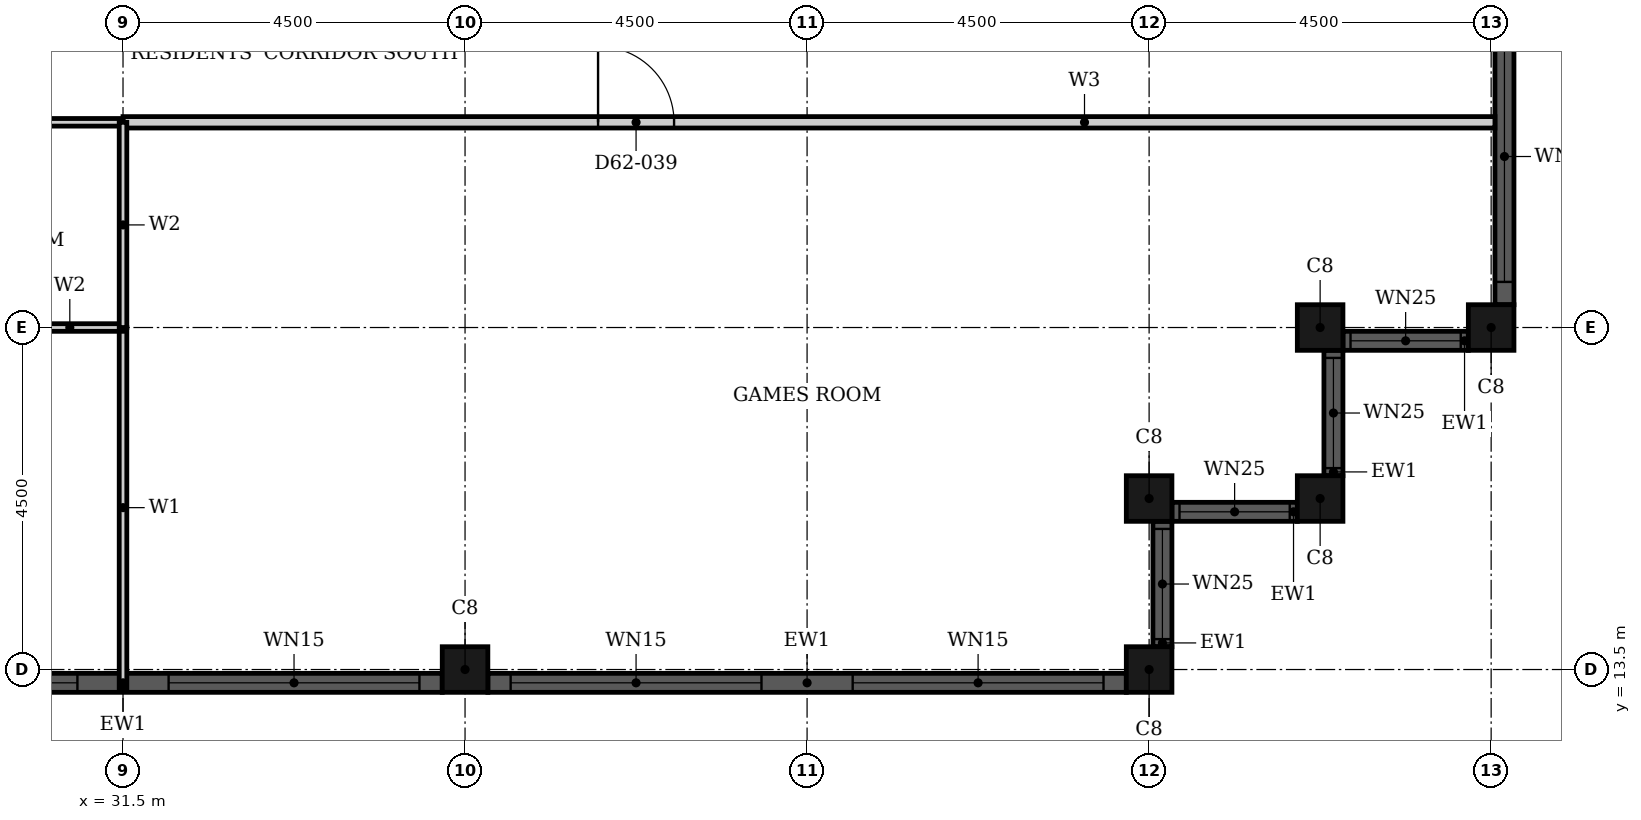
"""IFC4 building model, lengths in metres.
Left out: names, types, materials, properties, quantities, classifications, styles, units other than length and angle.
Written with IfcOpenShell. Run it as: python <this file> out.ifc"""

import sys

from ifc_helpers import new_model, si_unit, direction, frame, frame_2d, origin, origin_2d, place, context, subcontext, project, spatial, rectangle, hollow_rectangle, extrude, element, fill, save


model = new_model("IFC4")
c1 = context("Model", 3, precision=1e-05, world=origin(), true_north=direction((0.0, 1.0)))
c2 = subcontext(c1, "Body", "Model", "MODEL_VIEW")
j1 = project(units=[si_unit("LENGTHUNIT", "METRE"), si_unit("PLANEANGLEUNIT", "RADIAN")], contexts=[c1])
p1 = place(None, origin())
s1 = spatial("IfcSite", under=j1, at=p1, CompositionType="ELEMENT")
p2 = place(p1, origin())
s2 = spatial("IfcBuilding", under=s1, at=p2, CompositionType="ELEMENT")
p3 = place(p2, frame((0.0, 0.0, 245.3)))
s3 = spatial("IfcBuildingStorey", under=s2, at=p3, CompositionType="ELEMENT", Elevation=245.3)
for number, where, z_axis, x_axis in (
    (1, (36.0, 13.5, 0.0), (0.0, 0.0, 1.0), (1.0, 0.0, 0.0)),
    (2, (45.0, 13.5, 0.0), (0.0, 0.0, 1.0), (1.0, 0.0, 0.0)),
    (3, (45.0, 15.75, 0.0), (0.0, 0.0, 1.0), (1.0, 0.0, 0.0)),
    (4, (47.25, 15.75, 0.0), (0.0, 0.0, 1.0), (1.0, 0.0, 0.0)),
    (5, (47.25, 18.0, 0.0), (0.0, 0.0, 1.0), (1.0, 0.0, 0.0)),
    (6, (49.5, 18.0, 0.0), (0.0, 0.0, 1.0), (1.0, 0.0, 0.0)),
):
    element("IfcColumn", number, at=place(p3, frame(where, z_axis=z_axis, x_axis=x_axis)), inside=s3, PredefinedType="COLUMN", context=c2, shape_type="SweptSolid", body=[
        extrude(hollow_rectangle(XDim=0.6, YDim=0.6, WallThickness=0.02, at=origin_2d()), origin(), (0.0, 0.0, 1.0), 3.7),
    ])
p4 = place(p3, frame((27.3, 13.325, 0.0), z_axis=(0.0, 0.0, 1.0), x_axis=(1.0, 0.0, 0.0)))
e7 = element("IfcWall", 7, at=p4, inside=s3, PredefinedType="SOLIDWALL", context=c2, shape_type="SweptSolid", body=[
    extrude(rectangle(XDim=8.4, YDim=0.25, at=frame_2d((4.2, 0.0))), origin(), (0.0, 0.0, 1.0), 3.7),
])
p5 = place(p4, frame((0.3, 0.0, 0.45)))
e8 = element("IfcOpeningElement", 8, at=p5, cuts=e7, PredefinedType="OPENING", context=c2, shape_type="SweptSolid", body=[
    extrude(rectangle(XDim=3.3, YDim=2.3, at=frame_2d((1.65, 1.15))), frame((0.0, 0.135, 0.0), z_axis=(0.0, -1.0, 0.0), x_axis=(1.0, 0.0, 0.0)), (0.0, 0.0, 1.0), 0.27),
])
p6 = place(p4, frame((4.8, 0.0, 0.45)))
e9 = element("IfcOpeningElement", 9, at=p6, cuts=e7, PredefinedType="OPENING", context=c2, shape_type="SweptSolid", body=[
    extrude(rectangle(XDim=3.3, YDim=2.3, at=frame_2d((1.65, 1.15))), frame((0.0, 0.135, 0.0), z_axis=(0.0, -1.0, 0.0), x_axis=(1.0, 0.0, 0.0)), (0.0, 0.0, 1.0), 0.27),
])
p7 = place(p3, frame((36.3, 13.325, 0.0), z_axis=(0.0, 0.0, 1.0), x_axis=(1.0, 0.0, 0.0)))
e10 = element("IfcWall", 10, at=p7, inside=s3, PredefinedType="SOLIDWALL", context=c2, shape_type="SweptSolid", body=[
    extrude(rectangle(XDim=8.4, YDim=0.25, at=frame_2d((4.2, 0.0))), origin(), (0.0, 0.0, 1.0), 3.7),
])
p8 = place(p7, frame((0.3, 0.0, 0.45)))
e11 = element("IfcOpeningElement", 11, at=p8, cuts=e10, PredefinedType="OPENING", context=c2, shape_type="SweptSolid", body=[
    extrude(rectangle(XDim=3.3, YDim=2.3, at=frame_2d((1.65, 1.15))), frame((0.0, 0.135, 0.0), z_axis=(0.0, -1.0, 0.0), x_axis=(1.0, 0.0, 0.0)), (0.0, 0.0, 1.0), 0.27),
])
p9 = place(p7, frame((4.8, 0.0, 0.45)))
e12 = element("IfcOpeningElement", 12, at=p9, cuts=e10, PredefinedType="OPENING", context=c2, shape_type="SweptSolid", body=[
    extrude(rectangle(XDim=3.3, YDim=2.3, at=frame_2d((1.65, 1.15))), frame((0.0, 0.135, 0.0), z_axis=(0.0, -1.0, 0.0), x_axis=(1.0, 0.0, 0.0)), (0.0, 0.0, 1.0), 0.27),
])
p10 = place(p3, frame((45.175, 13.8, 0.0), z_axis=(0.0, 0.0, 1.0), x_axis=(0.0, 1.0, 0.0)))
e13 = element("IfcWall", 13, at=p10, inside=s3, PredefinedType="SOLIDWALL", context=c2, shape_type="SweptSolid", body=[
    extrude(rectangle(XDim=1.65, YDim=0.25, at=frame_2d((0.825, 0.0))), origin(), (0.0, 0.0, 1.0), 3.7),
])
p11 = place(p10, frame((0.1, 0.0, 0.9)))
e14 = element("IfcOpeningElement", 14, at=p11, cuts=e13, PredefinedType="OPENING", context=c2, shape_type="SweptSolid", body=[
    extrude(rectangle(XDim=1.45, YDim=1.85, at=frame_2d((0.725, 0.925))), frame((0.0, 0.135, 0.0), z_axis=(0.0, -1.0, 0.0), x_axis=(1.0, 0.0, 0.0)), (0.0, 0.0, 1.0), 0.27),
])
p12 = place(p3, frame((45.3, 15.575, 0.0), z_axis=(0.0, 0.0, 1.0), x_axis=(1.0, 0.0, 0.0)))
e15 = element("IfcWall", 15, at=p12, inside=s3, PredefinedType="SOLIDWALL", context=c2, shape_type="SweptSolid", body=[
    extrude(rectangle(XDim=1.65, YDim=0.25, at=frame_2d((0.825, 0.0))), origin(), (0.0, 0.0, 1.0), 3.7),
])
p13 = place(p12, frame((0.1, 0.0, 0.9)))
e16 = element("IfcOpeningElement", 16, at=p13, cuts=e15, PredefinedType="OPENING", context=c2, shape_type="SweptSolid", body=[
    extrude(rectangle(XDim=1.45, YDim=1.85, at=frame_2d((0.725, 0.925))), frame((0.0, 0.135, 0.0), z_axis=(0.0, -1.0, 0.0), x_axis=(1.0, 0.0, 0.0)), (0.0, 0.0, 1.0), 0.27),
])
p14 = place(p3, frame((47.425, 16.05, 0.0), z_axis=(0.0, 0.0, 1.0), x_axis=(0.0, 1.0, 0.0)))
e17 = element("IfcWall", 17, at=p14, inside=s3, PredefinedType="SOLIDWALL", context=c2, shape_type="SweptSolid", body=[
    extrude(rectangle(XDim=1.65, YDim=0.25, at=frame_2d((0.825, 0.0))), origin(), (0.0, 0.0, 1.0), 3.7),
])
p15 = place(p14, frame((0.1, 0.0, 0.9)))
e18 = element("IfcOpeningElement", 18, at=p15, cuts=e17, PredefinedType="OPENING", context=c2, shape_type="SweptSolid", body=[
    extrude(rectangle(XDim=1.45, YDim=1.85, at=frame_2d((0.725, 0.925))), frame((0.0, 0.135, 0.0), z_axis=(0.0, -1.0, 0.0), x_axis=(1.0, 0.0, 0.0)), (0.0, 0.0, 1.0), 0.27),
])
p16 = place(p3, frame((47.55, 17.825, 0.0), z_axis=(0.0, 0.0, 1.0), x_axis=(1.0, 0.0, 0.0)))
e19 = element("IfcWall", 19, at=p16, inside=s3, PredefinedType="SOLIDWALL", context=c2, shape_type="SweptSolid", body=[
    extrude(rectangle(XDim=1.65, YDim=0.25, at=frame_2d((0.825, 0.0))), origin(), (0.0, 0.0, 1.0), 3.7),
])
p17 = place(p16, frame((0.1, 0.0, 0.9)))
e20 = element("IfcOpeningElement", 20, at=p17, cuts=e19, PredefinedType="OPENING", context=c2, shape_type="SweptSolid", body=[
    extrude(rectangle(XDim=1.45, YDim=1.85, at=frame_2d((0.725, 0.925))), frame((0.0, 0.135, 0.0), z_axis=(0.0, -1.0, 0.0), x_axis=(1.0, 0.0, 0.0)), (0.0, 0.0, 1.0), 0.27),
])
p18 = place(p3, frame((49.675, 18.3, 0.0), z_axis=(0.0, 0.0, 1.0), x_axis=(0.0, 1.0, 0.0)))
e21 = element("IfcWall", 21, at=p18, inside=s3, PredefinedType="SOLIDWALL", context=c2, shape_type="SweptSolid", body=[
    extrude(rectangle(XDim=8.4, YDim=0.25, at=frame_2d((4.2, 0.0))), origin(), (0.0, 0.0, 1.0), 3.7),
])
p19 = place(p18, frame((0.3, 0.0, 0.45)))
e22 = element("IfcOpeningElement", 22, at=p19, cuts=e21, PredefinedType="OPENING", context=c2, shape_type="SweptSolid", body=[
    extrude(rectangle(XDim=3.3, YDim=2.3, at=frame_2d((1.65, 1.15))), frame((0.0, 0.135, 0.0), z_axis=(0.0, -1.0, 0.0), x_axis=(1.0, 0.0, 0.0)), (0.0, 0.0, 1.0), 0.27),
])
p20 = place(p18, frame((4.8, 0.0, 0.45)))
e23 = element("IfcOpeningElement", 23, at=p20, cuts=e21, PredefinedType="OPENING", context=c2, shape_type="SweptSolid", body=[
    extrude(rectangle(XDim=3.3, YDim=2.3, at=frame_2d((1.65, 1.15))), frame((0.0, 0.135, 0.0), z_axis=(0.0, -1.0, 0.0), x_axis=(1.0, 0.0, 0.0)), (0.0, 0.0, 1.0), 0.27),
])
p21 = place(p3, frame((31.5, 20.7, 0.0), z_axis=(0.0, 0.0, 1.0), x_axis=(1.0, 0.0, 0.0)))
e24 = element("IfcWall", 24, at=p21, inside=s3, PredefinedType="PARTITIONING", context=c2, shape_type="SweptSolid", body=[
    extrude(rectangle(XDim=18.05, YDim=0.15, at=frame_2d((9.025, 0.0))), origin(), (0.0, 0.0, 1.0), 3.4),
])
p22 = place(p21, frame((6.25, 0.0, 0.0)))
e25 = element("IfcOpeningElement", 25, at=p22, cuts=e24, PredefinedType="OPENING", context=c2, shape_type="SweptSolid", body=[
    extrude(rectangle(XDim=1.0, YDim=2.1, at=frame_2d((0.5, 1.05))), frame((0.0, 0.085, 0.0), z_axis=(0.0, -1.0, 0.0), x_axis=(1.0, 0.0, 0.0)), (0.0, 0.0, 1.0), 0.17),
])
p23 = place(p3, frame((31.5, 13.26, 0.0), z_axis=(0.0, 0.0, 1.0), x_axis=(0.0, 1.0, 0.0)))
e26 = element("IfcWall", 26, at=p23, inside=s3, PredefinedType="PARTITIONING", context=c2, shape_type="SweptSolid", body=[
    extrude(rectangle(XDim=4.74, YDim=0.1, at=frame_2d((2.37, 0.0))), origin(), (0.0, 0.0, 1.0), 3.4),
])
p24 = place(p3, frame((27.9, 18.0, 0.0), z_axis=(0.0, 0.0, 1.0), x_axis=(1.0, 0.0, 0.0)))
e27 = element("IfcWall", 27, at=p24, inside=s3, PredefinedType="PARTITIONING", context=c2, shape_type="SweptSolid", body=[
    extrude(rectangle(XDim=3.6, YDim=0.1, at=frame_2d((1.8, 0.0))), origin(), (0.0, 0.0, 1.0), 3.4),
])
p25 = place(p24, frame((1.4, 0.0, 0.0)))
e28 = element("IfcOpeningElement", 28, at=p25, cuts=e27, PredefinedType="OPENING", context=c2, shape_type="SweptSolid", body=[
    extrude(rectangle(XDim=0.8, YDim=2.1, at=frame_2d((0.4, 1.05))), frame((0.0, 0.06, 0.0), z_axis=(0.0, -1.0, 0.0), x_axis=(1.0, 0.0, 0.0)), (0.0, 0.0, 1.0), 0.12),
])
p26 = place(p3, frame((27.9, 20.7, 0.0), z_axis=(0.0, 0.0, 1.0), x_axis=(1.0, 0.0, 0.0)))
e29 = element("IfcWall", 29, at=p26, inside=s3, PredefinedType="PARTITIONING", context=c2, shape_type="SweptSolid", body=[
    extrude(rectangle(XDim=3.6, YDim=0.1, at=frame_2d((1.8, 0.0))), origin(), (0.0, 0.0, 1.0), 3.4),
])
p27 = place(p3, frame((31.5, 18.0, 0.0), z_axis=(0.0, 0.0, 1.0), x_axis=(0.0, 1.0, 0.0)))
e30 = element("IfcWall", 30, at=p27, inside=s3, PredefinedType="PARTITIONING", context=c2, shape_type="SweptSolid", body=[
    extrude(rectangle(XDim=2.7, YDim=0.1, at=frame_2d((1.35, 0.0))), origin(), (0.0, 0.0, 1.0), 3.4),
])
p28 = place(p5, origin())
e31 = element("IfcWindow", 31, at=p28, inside=s3, PartitioningType="SINGLE_PANEL", PredefinedType="WINDOW", context=c2, shape_type="SweptSolid", body=[
    extrude(rectangle(XDim=3.3, YDim=2.3, at=frame_2d((1.65, 1.15))), frame((0.0, 0.03, 0.0), z_axis=(0.0, -1.0, 0.0), x_axis=(1.0, 0.0, 0.0)), (0.0, 0.0, 1.0), 0.06),
])
fill(e8, e31)
p29 = place(p6, origin())
e32 = element("IfcWindow", 32, at=p29, inside=s3, PartitioningType="SINGLE_PANEL", PredefinedType="WINDOW", context=c2, shape_type="SweptSolid", body=[
    extrude(rectangle(XDim=3.3, YDim=2.3, at=frame_2d((1.65, 1.15))), frame((0.0, 0.03, 0.0), z_axis=(0.0, -1.0, 0.0), x_axis=(1.0, 0.0, 0.0)), (0.0, 0.0, 1.0), 0.06),
])
fill(e9, e32)
p30 = place(p8, origin())
e33 = element("IfcWindow", 33, at=p30, inside=s3, PartitioningType="SINGLE_PANEL", PredefinedType="WINDOW", context=c2, shape_type="SweptSolid", body=[
    extrude(rectangle(XDim=3.3, YDim=2.3, at=frame_2d((1.65, 1.15))), frame((0.0, 0.03, 0.0), z_axis=(0.0, -1.0, 0.0), x_axis=(1.0, 0.0, 0.0)), (0.0, 0.0, 1.0), 0.06),
])
fill(e11, e33)
p31 = place(p9, origin())
e34 = element("IfcWindow", 34, at=p31, inside=s3, PartitioningType="SINGLE_PANEL", PredefinedType="WINDOW", context=c2, shape_type="SweptSolid", body=[
    extrude(rectangle(XDim=3.3, YDim=2.3, at=frame_2d((1.65, 1.15))), frame((0.0, 0.03, 0.0), z_axis=(0.0, -1.0, 0.0), x_axis=(1.0, 0.0, 0.0)), (0.0, 0.0, 1.0), 0.06),
])
fill(e12, e34)
p32 = place(p11, origin())
e35 = element("IfcWindow", 35, at=p32, inside=s3, PartitioningType="SINGLE_PANEL", PredefinedType="WINDOW", context=c2, shape_type="SweptSolid", body=[
    extrude(rectangle(XDim=1.45, YDim=1.85, at=frame_2d((0.725, 0.925))), frame((0.0, 0.03, 0.0), z_axis=(0.0, -1.0, 0.0), x_axis=(1.0, 0.0, 0.0)), (0.0, 0.0, 1.0), 0.06),
])
fill(e14, e35)
p33 = place(p13, origin())
e36 = element("IfcWindow", 36, at=p33, inside=s3, PartitioningType="SINGLE_PANEL", PredefinedType="WINDOW", context=c2, shape_type="SweptSolid", body=[
    extrude(rectangle(XDim=1.45, YDim=1.85, at=frame_2d((0.725, 0.925))), frame((0.0, 0.03, 0.0), z_axis=(0.0, -1.0, 0.0), x_axis=(1.0, 0.0, 0.0)), (0.0, 0.0, 1.0), 0.06),
])
fill(e16, e36)
p34 = place(p15, origin())
e37 = element("IfcWindow", 37, at=p34, inside=s3, PartitioningType="SINGLE_PANEL", PredefinedType="WINDOW", context=c2, shape_type="SweptSolid", body=[
    extrude(rectangle(XDim=1.45, YDim=1.85, at=frame_2d((0.725, 0.925))), frame((0.0, 0.03, 0.0), z_axis=(0.0, -1.0, 0.0), x_axis=(1.0, 0.0, 0.0)), (0.0, 0.0, 1.0), 0.06),
])
fill(e18, e37)
p35 = place(p17, origin())
e38 = element("IfcWindow", 38, at=p35, inside=s3, PartitioningType="SINGLE_PANEL", PredefinedType="WINDOW", context=c2, shape_type="SweptSolid", body=[
    extrude(rectangle(XDim=1.45, YDim=1.85, at=frame_2d((0.725, 0.925))), frame((0.0, 0.03, 0.0), z_axis=(0.0, -1.0, 0.0), x_axis=(1.0, 0.0, 0.0)), (0.0, 0.0, 1.0), 0.06),
])
fill(e20, e38)
p36 = place(p19, origin())
e39 = element("IfcWindow", 39, at=p36, inside=s3, PartitioningType="SINGLE_PANEL", PredefinedType="WINDOW", context=c2, shape_type="SweptSolid", body=[
    extrude(rectangle(XDim=3.3, YDim=2.3, at=frame_2d((1.65, 1.15))), frame((0.0, 0.03, 0.0), z_axis=(0.0, -1.0, 0.0), x_axis=(1.0, 0.0, 0.0)), (0.0, 0.0, 1.0), 0.06),
])
fill(e22, e39)
p37 = place(p22, origin())
e40 = element("IfcDoor", 40, at=p37, inside=s3, OperationType="SINGLE_SWING_LEFT", PredefinedType="DOOR", context=c2, shape_type="SweptSolid", body=[
    extrude(rectangle(XDim=1.0, YDim=2.1, at=frame_2d((0.5, 1.05))), frame((0.0, 0.025, 0.0), z_axis=(0.0, -1.0, 0.0), x_axis=(1.0, 0.0, 0.0)), (0.0, 0.0, 1.0), 0.05),
])
fill(e25, e40)
save(model, sys.argv[1])
